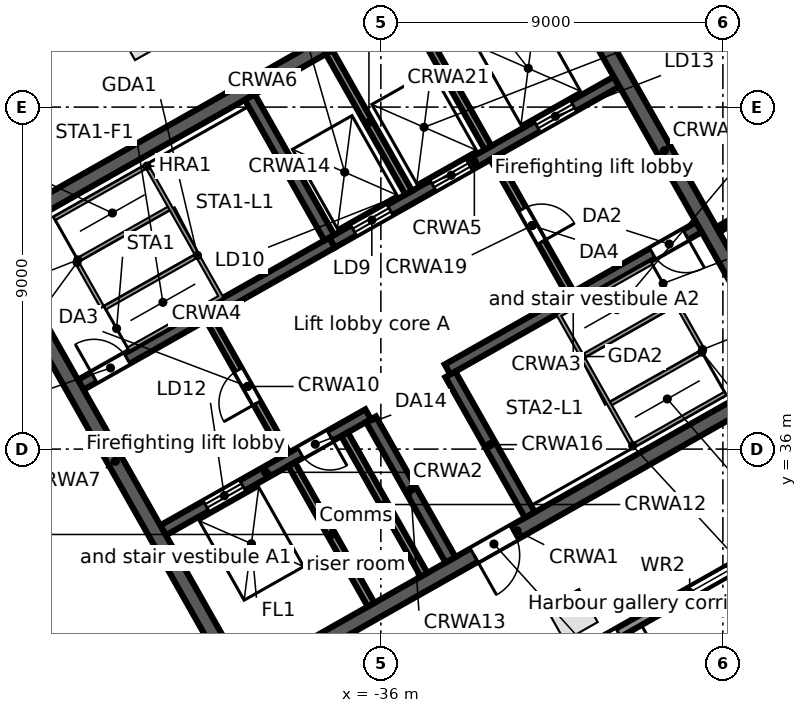
"""IFC4 building model, lengths in metres.
Left out: names, types, materials, properties, quantities, classifications, styles, units other than length and angle.
Written with IfcOpenShell. Run it as: python <this file> out.ifc"""

import sys

from ifc_helpers import new_model, si_unit, direction, frame, frame_2d, origin, origin_2d, place, context, subcontext, project, spatial, rectangle, extrude, element, fill, save


model = new_model("IFC4")
c1 = context("Model", 3, precision=1e-05, world=origin(), true_north=direction((0.0, 1.0)))
c2 = subcontext(c1, "Body", "Model", "MODEL_VIEW")
j1 = project(units=[si_unit("LENGTHUNIT", "METRE"), si_unit("PLANEANGLEUNIT", "RADIAN")], contexts=[c1])
p1 = place(None, origin())
s1 = spatial("IfcSite", under=j1, at=p1, CompositionType="ELEMENT")
p2 = place(p1, origin())
s2 = spatial("IfcBuilding", under=s1, at=p2, CompositionType="ELEMENT")
p3 = place(p2, frame((0.0, 0.0, 327.9)))
s3 = spatial("IfcBuildingStorey", under=s2, at=p3, CompositionType="ELEMENT", Elevation=327.9)
for number, where, z_axis, x_axis in (
    (1, (-42.28, 46.919, 0.0), (0.0, 0.0, 1.0), (-0.87, -0.492, 0.0)),
    (2, (-30.976, 31.635, 0.0), (0.0, 0.0, 1.0), (0.87, 0.492, 0.0)),
):
    element("IfcColumn", number, at=place(p3, frame(where, z_axis=z_axis, x_axis=x_axis)), inside=s3, PredefinedType="COLUMN", context=c2, shape_type="SweptSolid", body=[
        extrude(rectangle(XDim=1.0, YDim=1.0, at=origin_2d()), origin(), (0.0, 0.0, 1.0), 3.8),
    ])
p4 = place(p3, frame((-44.115, 26.507, 0.0), z_axis=(0.0, 0.0, 1.0), x_axis=(-0.857166583633, 0.515039268311, 0.0)))
e3 = element("IfcWall", 3, at=p4, inside=s3, PredefinedType="STANDARD", context=c2, shape_type="SweptSolid", body=[
    extrude(rectangle(XDim=17.106, YDim=0.25, at=frame_2d((8.553, 0.0))), origin(), (0.0, 0.0, 1.0), 3.52),
])
p5 = place(p4, frame((14.417, 0.0, 0.8)))
e4 = element("IfcOpeningElement", 4, at=p5, cuts=e3, PredefinedType="OPENING", context=c2, shape_type="SweptSolid", body=[
    extrude(rectangle(XDim=2.4, YDim=2.2, at=frame_2d((1.2, 1.1))), frame((0.0, 0.135, 0.0), z_axis=(0.0, -1.0, 0.0), x_axis=(1.0, 0.0, 0.0)), (0.0, 0.0, 1.0), 0.27),
])
p6 = place(p4, frame((11.584, 0.0, 0.8)))
e5 = element("IfcOpeningElement", 5, at=p6, cuts=e3, PredefinedType="OPENING", context=c2, shape_type="SweptSolid", body=[
    extrude(rectangle(XDim=2.4, YDim=2.2, at=frame_2d((1.2, 1.1))), frame((0.0, 0.135, 0.0), z_axis=(0.0, -1.0, 0.0), x_axis=(1.0, 0.0, 0.0)), (0.0, 0.0, 1.0), 0.27),
])
p7 = place(p4, frame((8.75, 0.0, 0.8)))
e6 = element("IfcOpeningElement", 6, at=p7, cuts=e3, PredefinedType="OPENING", context=c2, shape_type="SweptSolid", body=[
    extrude(rectangle(XDim=2.4, YDim=2.2, at=frame_2d((1.2, 1.1))), frame((0.0, 0.135, 0.0), z_axis=(0.0, -1.0, 0.0), x_axis=(1.0, 0.0, 0.0)), (0.0, 0.0, 1.0), 0.27),
])
p8 = place(p4, frame((5.917, 0.0, 0.8)))
e7 = element("IfcOpeningElement", 7, at=p8, cuts=e3, PredefinedType="OPENING", context=c2, shape_type="SweptSolid", body=[
    extrude(rectangle(XDim=2.4, YDim=2.2, at=frame_2d((1.2, 1.1))), frame((0.0, 0.135, 0.0), z_axis=(0.0, -1.0, 0.0), x_axis=(1.0, 0.0, 0.0)), (0.0, 0.0, 1.0), 0.27),
])
p9 = place(p4, frame((3.084, 0.0, 0.8)))
e8 = element("IfcOpeningElement", 8, at=p9, cuts=e3, PredefinedType="OPENING", context=c2, shape_type="SweptSolid", body=[
    extrude(rectangle(XDim=2.4, YDim=2.2, at=frame_2d((1.2, 1.1))), frame((0.0, 0.135, 0.0), z_axis=(0.0, -1.0, 0.0), x_axis=(1.0, 0.0, 0.0)), (0.0, 0.0, 1.0), 0.27),
])
p10 = place(p4, frame((0.25, 0.0, 0.8)))
e9 = element("IfcOpeningElement", 9, at=p10, cuts=e3, PredefinedType="OPENING", context=c2, shape_type="SweptSolid", body=[
    extrude(rectangle(XDim=2.4, YDim=2.2, at=frame_2d((1.2, 1.1))), frame((0.0, 0.135, 0.0), z_axis=(0.0, -1.0, 0.0), x_axis=(1.0, 0.0, 0.0)), (0.0, 0.0, 1.0), 0.27),
])
p11 = place(p3, frame((-3.017, 46.293, 0.0), z_axis=(0.0, 0.0, 1.0), x_axis=(-0.870355474887, -0.492423950812, 0.0)))
e10 = element("IfcWall", 10, at=p11, inside=s3, PredefinedType="STANDARD", context=c2, shape_type="SweptSolid", body=[
    extrude(rectangle(XDim=40.34, YDim=0.25, at=frame_2d((20.17, 0.0))), origin(), (0.0, 0.0, 1.0), 3.52),
])
p12 = place(p11, frame((37.428, 0.0, 0.8)))
e11 = element("IfcOpeningElement", 11, at=p12, cuts=e10, PredefinedType="OPENING", context=c2, shape_type="SweptSolid", body=[
    extrude(rectangle(XDim=2.4, YDim=2.2, at=frame_2d((1.2, 1.1))), frame((0.0, 0.135, 0.0), z_axis=(0.0, -1.0, 0.0), x_axis=(1.0, 0.0, 0.0)), (0.0, 0.0, 1.0), 0.27),
])
p13 = place(p11, frame((34.372, 0.0, 0.0)))
e12 = element("IfcOpeningElement", 12, at=p13, cuts=e10, PredefinedType="OPENING", context=c2, shape_type="SweptSolid", body=[
    extrude(rectangle(XDim=1.8, YDim=2.4, at=frame_2d((0.9, 1.2))), frame((0.0, 0.135, 0.0), z_axis=(0.0, -1.0, 0.0), x_axis=(1.0, 0.0, 0.0)), (0.0, 0.0, 1.0), 0.27),
])
p14 = place(p11, frame((30.716, 0.0, 0.8)))
e13 = element("IfcOpeningElement", 13, at=p14, cuts=e10, PredefinedType="OPENING", context=c2, shape_type="SweptSolid", body=[
    extrude(rectangle(XDim=2.4, YDim=2.2, at=frame_2d((1.2, 1.1))), frame((0.0, 0.135, 0.0), z_axis=(0.0, -1.0, 0.0), x_axis=(1.0, 0.0, 0.0)), (0.0, 0.0, 1.0), 0.27),
])
p15 = place(p11, frame((27.36, 0.0, 0.8)))
e14 = element("IfcOpeningElement", 14, at=p15, cuts=e10, PredefinedType="OPENING", context=c2, shape_type="SweptSolid", body=[
    extrude(rectangle(XDim=2.4, YDim=2.2, at=frame_2d((1.2, 1.1))), frame((0.0, 0.135, 0.0), z_axis=(0.0, -1.0, 0.0), x_axis=(1.0, 0.0, 0.0)), (0.0, 0.0, 1.0), 0.27),
])
p16 = place(p11, frame((24.304, 0.0, 0.0)))
e15 = element("IfcOpeningElement", 15, at=p16, cuts=e10, PredefinedType="OPENING", context=c2, shape_type="SweptSolid", body=[
    extrude(rectangle(XDim=1.8, YDim=2.4, at=frame_2d((0.9, 1.2))), frame((0.0, 0.135, 0.0), z_axis=(0.0, -1.0, 0.0), x_axis=(1.0, 0.0, 0.0)), (0.0, 0.0, 1.0), 0.27),
])
p17 = place(p11, frame((20.648, 0.0, 0.8)))
e16 = element("IfcOpeningElement", 16, at=p17, cuts=e10, PredefinedType="OPENING", context=c2, shape_type="SweptSolid", body=[
    extrude(rectangle(XDim=2.4, YDim=2.2, at=frame_2d((1.2, 1.1))), frame((0.0, 0.135, 0.0), z_axis=(0.0, -1.0, 0.0), x_axis=(1.0, 0.0, 0.0)), (0.0, 0.0, 1.0), 0.27),
])
p18 = place(p11, frame((17.292, 0.0, 0.8)))
e17 = element("IfcOpeningElement", 17, at=p18, cuts=e10, PredefinedType="OPENING", context=c2, shape_type="SweptSolid", body=[
    extrude(rectangle(XDim=2.4, YDim=2.2, at=frame_2d((1.2, 1.1))), frame((0.0, 0.135, 0.0), z_axis=(0.0, -1.0, 0.0), x_axis=(1.0, 0.0, 0.0)), (0.0, 0.0, 1.0), 0.27),
])
p19 = place(p11, frame((14.236, 0.0, 0.0)))
e18 = element("IfcOpeningElement", 18, at=p19, cuts=e10, PredefinedType="OPENING", context=c2, shape_type="SweptSolid", body=[
    extrude(rectangle(XDim=1.8, YDim=2.4, at=frame_2d((0.9, 1.2))), frame((0.0, 0.135, 0.0), z_axis=(0.0, -1.0, 0.0), x_axis=(1.0, 0.0, 0.0)), (0.0, 0.0, 1.0), 0.27),
])
p20 = place(p11, frame((10.58, 0.0, 0.8)))
e19 = element("IfcOpeningElement", 19, at=p20, cuts=e10, PredefinedType="OPENING", context=c2, shape_type="SweptSolid", body=[
    extrude(rectangle(XDim=2.4, YDim=2.2, at=frame_2d((1.2, 1.1))), frame((0.0, 0.135, 0.0), z_axis=(0.0, -1.0, 0.0), x_axis=(1.0, 0.0, 0.0)), (0.0, 0.0, 1.0), 0.27),
])
p21 = place(p11, frame((7.224, 0.0, 0.8)))
e20 = element("IfcOpeningElement", 20, at=p21, cuts=e10, PredefinedType="OPENING", context=c2, shape_type="SweptSolid", body=[
    extrude(rectangle(XDim=2.4, YDim=2.2, at=frame_2d((1.2, 1.1))), frame((0.0, 0.135, 0.0), z_axis=(0.0, -1.0, 0.0), x_axis=(1.0, 0.0, 0.0)), (0.0, 0.0, 1.0), 0.27),
])
p22 = place(p11, frame((4.168, 0.0, 0.0)))
e21 = element("IfcOpeningElement", 21, at=p22, cuts=e10, PredefinedType="OPENING", context=c2, shape_type="SweptSolid", body=[
    extrude(rectangle(XDim=1.8, YDim=2.4, at=frame_2d((0.9, 1.2))), frame((0.0, 0.135, 0.0), z_axis=(0.0, -1.0, 0.0), x_axis=(1.0, 0.0, 0.0)), (0.0, 0.0, 1.0), 0.27),
])
p23 = place(p11, frame((0.512, 0.0, 0.8)))
e22 = element("IfcOpeningElement", 22, at=p23, cuts=e10, PredefinedType="OPENING", context=c2, shape_type="SweptSolid", body=[
    extrude(rectangle(XDim=2.4, YDim=2.2, at=frame_2d((1.2, 1.1))), frame((0.0, 0.135, 0.0), z_axis=(0.0, -1.0, 0.0), x_axis=(1.0, 0.0, 0.0)), (0.0, 0.0, 1.0), 0.27),
])
p24 = place(p3, frame((-39.813, 29.662, 0.0), z_axis=(0.0, 0.0, 1.0), x_axis=(0.870350116061, 0.492433422375, 0.0)))
e23 = element("IfcWall", 23, at=p24, inside=s3, PredefinedType="SOLIDWALL", context=c2, shape_type="SweptSolid", body=[
    extrude(rectangle(XDim=17.0, YDim=0.4, at=frame_2d((8.5, 0.0))), origin(), (0.0, 0.0, 1.0), 3.52),
])
p25 = place(p24, frame((7.2, 0.0, 0.0)))
e24 = element("IfcOpeningElement", 24, at=p25, cuts=e23, PredefinedType="OPENING", context=c2, shape_type="SweptSolid", body=[
    extrude(rectangle(XDim=1.2, YDim=2.1, at=frame_2d((0.6, 1.05))), frame((0.0, 0.21, 0.0), z_axis=(0.0, -1.0, 0.0), x_axis=(1.0, 0.0, 0.0)), (0.0, 0.0, 1.0), 0.42),
])
p26 = place(p3, frame((-41.73, 33.863, 0.0), z_axis=(0.0, 0.0, 1.0), x_axis=(0.870350800578, 0.492432212525, 0.0)))
e25 = element("IfcWall", 25, at=p26, inside=s3, PredefinedType="SOLIDWALL", context=c2, shape_type="SweptSolid", body=[
    extrude(rectangle(XDim=6.2, YDim=0.3, at=frame_2d((3.1, 0.0))), origin(), (0.0, 0.0, 1.0), 3.52),
])
p27 = place(p26, frame((1.3, 0.0, 0.0)))
e26 = element("IfcOpeningElement", 26, at=p27, cuts=e25, PredefinedType="OPENING", context=c2, shape_type="SweptSolid", body=[
    extrude(rectangle(XDim=1.1, YDim=2.1, at=frame_2d((0.55, 1.05))), frame((0.0, 0.16, 0.0), z_axis=(0.0, -1.0, 0.0), x_axis=(1.0, 0.0, 0.0)), (0.0, 0.0, 1.0), 0.32),
])
p28 = place(p26, frame((4.15, 0.0, 0.0)))
e27 = element("IfcOpeningElement", 27, at=p28, cuts=e25, PredefinedType="OPENING", context=c2, shape_type="SweptSolid", body=[
    extrude(rectangle(XDim=0.9, YDim=2.1, at=frame_2d((0.45, 1.05))), frame((0.0, 0.16, 0.0), z_axis=(0.0, -1.0, 0.0), x_axis=(1.0, 0.0, 0.0)), (0.0, 0.0, 1.0), 0.32),
])
p29 = place(p3, frame((-34.245, 38.097, 0.0), z_axis=(0.0, 0.0, 1.0), x_axis=(0.870356351998, 0.492422400523, 0.0)))
e28 = element("IfcWall", 28, at=p29, inside=s3, PredefinedType="SOLIDWALL", context=c2, shape_type="SweptSolid", body=[
    extrude(rectangle(XDim=7.6, YDim=0.3, at=frame_2d((3.8, 0.0))), origin(), (0.0, 0.0, 1.0), 3.52),
])
p30 = place(p29, frame((6.2, 0.0, 0.0)))
e29 = element("IfcOpeningElement", 29, at=p30, cuts=e28, PredefinedType="OPENING", context=c2, shape_type="SweptSolid", body=[
    extrude(rectangle(XDim=1.0, YDim=2.1, at=frame_2d((0.5, 1.05))), frame((0.0, 0.16, 0.0), z_axis=(0.0, -1.0, 0.0), x_axis=(1.0, 0.0, 0.0)), (0.0, 0.0, 1.0), 0.32),
])
p31 = place(p3, frame((-43.897, 37.692, 0.0), z_axis=(0.0, 0.0, 1.0), x_axis=(0.870356351998, 0.492422400523, 0.0)))
e30 = element("IfcWall", 30, at=p31, inside=s3, PredefinedType="SOLIDWALL", context=c2, shape_type="SweptSolid", body=[
    extrude(rectangle(XDim=7.6, YDim=0.3, at=frame_2d((3.8, 0.0))), origin(), (0.0, 0.0, 1.0), 3.52),
])
p32 = place(p31, frame((0.4, 0.0, 0.0)))
e31 = element("IfcOpeningElement", 31, at=p32, cuts=e30, PredefinedType="OPENING", context=c2, shape_type="SweptSolid", body=[
    extrude(rectangle(XDim=1.0, YDim=2.1, at=frame_2d((0.5, 1.05))), frame((0.0, 0.16, 0.0), z_axis=(0.0, -1.0, 0.0), x_axis=(1.0, 0.0, 0.0)), (0.0, 0.0, 1.0), 0.32),
])
p33 = place(p3, frame((-37.282, 41.435, 0.0), z_axis=(0.0, 0.0, 1.0), x_axis=(0.870361315115, 0.492413628113, 0.0)))
e32 = element("IfcWall", 32, at=p33, inside=s3, PredefinedType="SOLIDWALL", context=c2, shape_type="SweptSolid", body=[
    extrude(rectangle(XDim=8.6, YDim=0.3, at=frame_2d((4.3, 0.0))), origin(), (0.0, 0.0, 1.0), 3.52),
])
p34 = place(p33, frame((0.65, 0.0, 0.0)))
e33 = element("IfcOpeningElement", 33, at=p34, cuts=e32, PredefinedType="OPENING", context=c2, shape_type="SweptSolid", body=[
    extrude(rectangle(XDim=1.1, YDim=2.1, at=frame_2d((0.55, 1.05))), frame((0.0, 0.16, 0.0), z_axis=(0.0, -1.0, 0.0), x_axis=(1.0, 0.0, 0.0)), (0.0, 0.0, 1.0), 0.32),
])
p35 = place(p33, frame((3.05, 0.0, 0.0)))
e34 = element("IfcOpeningElement", 34, at=p35, cuts=e32, PredefinedType="OPENING", context=c2, shape_type="SweptSolid", body=[
    extrude(rectangle(XDim=1.1, YDim=2.1, at=frame_2d((0.55, 1.05))), frame((0.0, 0.16, 0.0), z_axis=(0.0, -1.0, 0.0), x_axis=(1.0, 0.0, 0.0)), (0.0, 0.0, 1.0), 0.32),
])
p36 = place(p33, frame((6.2, 0.0, 0.0)))
e35 = element("IfcOpeningElement", 35, at=p36, cuts=e32, PredefinedType="OPENING", context=c2, shape_type="SweptSolid", body=[
    extrude(rectangle(XDim=1.1, YDim=2.1, at=frame_2d((0.55, 1.05))), frame((0.0, 0.16, 0.0), z_axis=(0.0, -1.0, 0.0), x_axis=(1.0, 0.0, 0.0)), (0.0, 0.0, 1.0), 0.32),
])
p37 = place(p3, frame((-46.51, 41.499, 0.0), z_axis=(0.0, 0.0, 1.0), x_axis=(0.870356271124, 0.492422543467, 0.0)))
e36 = element("IfcWall", 36, at=p37, inside=s3, PredefinedType="SOLIDWALL", context=c2, shape_type="SweptSolid", body=[
    extrude(rectangle(XDim=17.0, YDim=0.4, at=frame_2d((8.5, 0.0))), origin(), (0.0, 0.0, 1.0), 3.52),
])
p38 = place(p3, frame((-46.238, 41.423, 0.0), z_axis=(0.0, 0.0, 1.0), x_axis=(0.492421663121, -0.870356769198, 0.0)))
e37 = element("IfcWall", 37, at=p38, inside=s3, PredefinedType="SOLIDWALL", context=c2, shape_type="SweptSolid", body=[
    extrude(rectangle(XDim=13.2, YDim=0.4, at=frame_2d((6.6, 0.0))), origin(), (0.0, 0.0, 1.0), 3.52),
])
p39 = place(p3, frame((-38.349, 35.603, 0.0), z_axis=(0.0, 0.0, 1.0), x_axis=(0.492397924348, -0.870370199454, 0.0)))
e38 = element("IfcWall", 38, at=p39, inside=s3, PredefinedType="SOLIDWALL", context=c2, shape_type="SweptSolid", body=[
    extrude(rectangle(XDim=4.25, YDim=0.2, at=frame_2d((2.125, 0.0))), origin(), (0.0, 0.0, 1.0), 3.52),
])
p40 = place(p3, frame((-40.516, 39.433, 0.0), z_axis=(0.0, 0.0, 1.0), x_axis=(0.492453559952, -0.87033872216, 0.0)))
e39 = element("IfcWall", 39, at=p40, inside=s3, PredefinedType="PARTITIONING", context=c2, shape_type="SweptSolid", body=[
    extrude(rectangle(XDim=4.1, YDim=0.2, at=frame_2d((2.05, 0.0))), origin(), (0.0, 0.0, 1.0), 3.52),
])
p41 = place(p40, frame((1.55, 0.0, 0.0)))
e40 = element("IfcOpeningElement", 40, at=p41, cuts=e39, PredefinedType="OPENING", context=c2, shape_type="SweptSolid", body=[
    extrude(rectangle(XDim=1.0, YDim=2.1, at=frame_2d((0.5, 1.05))), frame((0.0, 0.11, 0.0), z_axis=(0.0, -1.0, 0.0), x_axis=(1.0, 0.0, 0.0)), (0.0, 0.0, 1.0), 0.22),
])
p42 = place(p3, frame((-36.956, 36.391, 0.0), z_axis=(0.0, 0.0, 1.0), x_axis=(0.492397924348, -0.870370199454, 0.0)))
e41 = element("IfcWall", 41, at=p42, inside=s3, PredefinedType="SOLIDWALL", context=c2, shape_type="SweptSolid", body=[
    extrude(rectangle(XDim=4.25, YDim=0.2, at=frame_2d((2.125, 0.0))), origin(), (0.0, 0.0, 1.0), 3.52),
])
for number, where, z_axis, x_axis in (
    (42, (-36.26, 36.785, 0.0), (0.0, 0.0, 1.0), (0.492, -0.87, 0.0)),
    (43, (-39.449, 45.264, 0.0), (0.0, 0.0, 1.0), (0.492, -0.87, 0.0)),
    (44, (-34.171, 37.967, 0.0), (0.0, 0.0, 1.0), (0.492, -0.87, 0.0)),
):
    element("IfcWall", number, at=place(p3, frame(where, z_axis=z_axis, x_axis=x_axis)), inside=s3, PredefinedType="SOLIDWALL", context=c2, shape_type="SweptSolid", body=[
        extrude(rectangle(XDim=4.25, YDim=0.3, at=frame_2d((2.125, 0.0))), origin(), (0.0, 0.0, 1.0), 3.52),
    ])
p43 = place(p3, frame((-37.36, 46.446, 0.0), z_axis=(0.0, 0.0, 1.0), x_axis=(0.492422543467, -0.870356271124, 0.0)))
e45 = element("IfcWall", 45, at=p43, inside=s3, PredefinedType="SOLIDWALL", context=c2, shape_type="SweptSolid", body=[
    extrude(rectangle(XDim=4.25, YDim=0.2, at=frame_2d((2.125, 0.0))), origin(), (0.0, 0.0, 1.0), 3.52),
])
p44 = place(p3, frame((-33.031, 43.667, 0.0), z_axis=(0.0, 0.0, 1.0), x_axis=(0.492408451753, -0.87036424366, 0.0)))
e46 = element("IfcWall", 46, at=p44, inside=s3, PredefinedType="PARTITIONING", context=c2, shape_type="SweptSolid", body=[
    extrude(rectangle(XDim=4.1, YDim=0.2, at=frame_2d((2.05, 0.0))), origin(), (0.0, 0.0, 1.0), 3.52),
])
p45 = place(p44, frame((1.55, 0.0, 0.0)))
e47 = element("IfcOpeningElement", 47, at=p45, cuts=e46, PredefinedType="OPENING", context=c2, shape_type="SweptSolid", body=[
    extrude(rectangle(XDim=1.0, YDim=2.1, at=frame_2d((0.5, 1.05))), frame((0.0, 0.11, 0.0), z_axis=(0.0, -1.0, 0.0), x_axis=(1.0, 0.0, 0.0)), (0.0, 0.0, 1.0), 0.22),
])
p46 = place(p3, frame((-35.271, 47.628, 0.0), z_axis=(0.0, 0.0, 1.0), x_axis=(0.492422543467, -0.870356271124, 0.0)))
e48 = element("IfcWall", 48, at=p46, inside=s3, PredefinedType="SOLIDWALL", context=c2, shape_type="SweptSolid", body=[
    extrude(rectangle(XDim=4.25, YDim=0.2, at=frame_2d((2.125, 0.0))), origin(), (0.0, 0.0, 1.0), 3.52),
])
p47 = place(p3, frame((-31.79, 49.597, 0.0), z_axis=(0.0, 0.0, 1.0), x_axis=(0.492421663121, -0.870356769198, 0.0)))
e49 = element("IfcWall", 49, at=p47, inside=s3, PredefinedType="SOLIDWALL", context=c2, shape_type="SweptSolid", body=[
    extrude(rectangle(XDim=13.2, YDim=0.4, at=frame_2d((6.6, 0.0))), origin(), (0.0, 0.0, 1.0), 3.52),
])
p48 = place(p3, frame((-27.134, 41.776, 0.0), z_axis=(0.0, 0.0, 1.0), x_axis=(0.870249744125, 0.492610782312, 0.0)))
e50 = element("IfcWall", 50, at=p48, inside=s3, PredefinedType="PARTITIONING", context=c2, shape_type="SweptSolid", body=[
    extrude(rectangle(XDim=2.499, YDim=0.15, at=frame_2d((1.25, 0.0))), origin(), (0.0, 0.0, 1.0), 2.792),
])
p49 = place(p14, origin())
e51 = element("IfcWindow", 51, at=p49, inside=s3, PartitioningType="SINGLE_PANEL", PredefinedType="WINDOW", context=c2, shape_type="SweptSolid", body=[
    extrude(rectangle(XDim=2.4, YDim=2.2, at=frame_2d((1.2, 1.1))), frame((0.0, 0.03, 0.0), z_axis=(0.0, -1.0, 0.0), x_axis=(1.0, 0.0, 0.0)), (0.0, 0.0, 1.0), 0.06),
])
fill(e13, e51)
p50 = place(p15, origin())
e52 = element("IfcWindow", 52, at=p50, inside=s3, PartitioningType="SINGLE_PANEL", PredefinedType="WINDOW", context=c2, shape_type="SweptSolid", body=[
    extrude(rectangle(XDim=2.4, YDim=2.2, at=frame_2d((1.2, 1.1))), frame((0.0, 0.03, 0.0), z_axis=(0.0, -1.0, 0.0), x_axis=(1.0, 0.0, 0.0)), (0.0, 0.0, 1.0), 0.06),
])
fill(e14, e52)
p51 = place(p34, origin())
e53 = element("IfcDoor", 53, at=p51, inside=s3, OperationType="DOUBLE_DOOR_SLIDING", PredefinedType="DOOR", context=c2, shape_type="SweptSolid", body=[
    extrude(rectangle(XDim=1.1, YDim=2.1, at=frame_2d((0.55, 1.05))), frame((0.0, 0.025, 0.0), z_axis=(0.0, -1.0, 0.0), x_axis=(1.0, 0.0, 0.0)), (0.0, 0.0, 1.0), 0.05),
])
fill(e33, e53)
p52 = place(p35, origin())
e54 = element("IfcDoor", 54, at=p52, inside=s3, OperationType="DOUBLE_DOOR_SLIDING", PredefinedType="DOOR", context=c2, shape_type="SweptSolid", body=[
    extrude(rectangle(XDim=1.1, YDim=2.1, at=frame_2d((0.55, 1.05))), frame((0.0, 0.025, 0.0), z_axis=(0.0, -1.0, 0.0), x_axis=(1.0, 0.0, 0.0)), (0.0, 0.0, 1.0), 0.05),
])
fill(e34, e54)
p53 = place(p36, origin())
e55 = element("IfcDoor", 55, at=p53, inside=s3, OperationType="DOUBLE_DOOR_SLIDING", PredefinedType="DOOR", context=c2, shape_type="SweptSolid", body=[
    extrude(rectangle(XDim=1.1, YDim=2.1, at=frame_2d((0.55, 1.05))), frame((0.0, 0.025, 0.0), z_axis=(0.0, -1.0, 0.0), x_axis=(1.0, 0.0, 0.0)), (0.0, 0.0, 1.0), 0.05),
])
fill(e35, e55)
p54 = place(p27, origin())
e56 = element("IfcDoor", 56, at=p54, inside=s3, OperationType="DOUBLE_DOOR_SLIDING", PredefinedType="DOOR", context=c2, shape_type="SweptSolid", body=[
    extrude(rectangle(XDim=1.1, YDim=2.1, at=frame_2d((0.55, 1.05))), frame((0.0, 0.025, 0.0), z_axis=(0.0, -1.0, 0.0), x_axis=(1.0, 0.0, 0.0)), (0.0, 0.0, 1.0), 0.05),
])
fill(e26, e56)
p55 = place(p32, origin())
e57 = element("IfcDoor", 57, at=p55, inside=s3, OperationType="SINGLE_SWING_LEFT", PredefinedType="DOOR", context=c2, shape_type="SweptSolid", body=[
    extrude(rectangle(XDim=1.0, YDim=2.1, at=frame_2d((0.5, 1.05))), frame((0.0, 0.025, 0.0), z_axis=(0.0, -1.0, 0.0), x_axis=(1.0, 0.0, 0.0)), (0.0, 0.0, 1.0), 0.05),
])
fill(e31, e57)
p56 = place(p30, frame((1.0, 0.0, 0.0), z_axis=(0.0, 0.0, 1.0), x_axis=(-1.0, 0.0, 0.0)))
e58 = element("IfcDoor", 58, at=p56, inside=s3, OperationType="SINGLE_SWING_LEFT", PredefinedType="DOOR", context=c2, shape_type="SweptSolid", body=[
    extrude(rectangle(XDim=1.0, YDim=2.1, at=frame_2d((0.5, 1.05))), frame((0.0, 0.025, 0.0), z_axis=(0.0, -1.0, 0.0), x_axis=(1.0, 0.0, 0.0)), (0.0, 0.0, 1.0), 0.05),
])
fill(e29, e58)
p57 = place(p41, frame((1.0, 0.0, 0.0), z_axis=(0.0, 0.0, 1.0), x_axis=(-1.0, 0.0, 0.0)))
e59 = element("IfcDoor", 59, at=p57, inside=s3, OperationType="SINGLE_SWING_LEFT", PredefinedType="DOOR", context=c2, shape_type="SweptSolid", body=[
    extrude(rectangle(XDim=1.0, YDim=2.1, at=frame_2d((0.5, 1.05))), frame((0.0, 0.025, 0.0), z_axis=(0.0, -1.0, 0.0), x_axis=(1.0, 0.0, 0.0)), (0.0, 0.0, 1.0), 0.05),
])
fill(e40, e59)
p58 = place(p45, origin())
e60 = element("IfcDoor", 60, at=p58, inside=s3, OperationType="SINGLE_SWING_RIGHT", PredefinedType="DOOR", context=c2, shape_type="SweptSolid", body=[
    extrude(rectangle(XDim=1.0, YDim=2.1, at=frame_2d((0.5, 1.05))), frame((0.0, 0.025, 0.0), z_axis=(0.0, -1.0, 0.0), x_axis=(1.0, 0.0, 0.0)), (0.0, 0.0, 1.0), 0.05),
])
fill(e47, e60)
p59 = place(p25, frame((1.2, 0.0, 0.0), z_axis=(0.0, 0.0, 1.0), x_axis=(-1.0, 0.0, 0.0)))
e61 = element("IfcDoor", 61, at=p59, inside=s3, OperationType="SINGLE_SWING_RIGHT", PredefinedType="DOOR", context=c2, shape_type="SweptSolid", body=[
    extrude(rectangle(XDim=1.2, YDim=2.1, at=frame_2d((0.6, 1.05))), frame((0.0, 0.025, 0.0), z_axis=(0.0, -1.0, 0.0), x_axis=(1.0, 0.0, 0.0)), (0.0, 0.0, 1.0), 0.05),
])
fill(e24, e61)
p60 = place(p28, frame((0.9, 0.0, 0.0), z_axis=(0.0, 0.0, 1.0), x_axis=(-1.0, 0.0, 0.0)))
e62 = element("IfcDoor", 62, at=p60, inside=s3, OperationType="SINGLE_SWING_LEFT", PredefinedType="DOOR", context=c2, shape_type="SweptSolid", body=[
    extrude(rectangle(XDim=0.9, YDim=2.1, at=frame_2d((0.45, 1.05))), frame((0.0, 0.025, 0.0), z_axis=(0.0, -1.0, 0.0), x_axis=(1.0, 0.0, 0.0)), (0.0, 0.0, 1.0), 0.05),
])
fill(e27, e62)
save(model, sys.argv[1])
